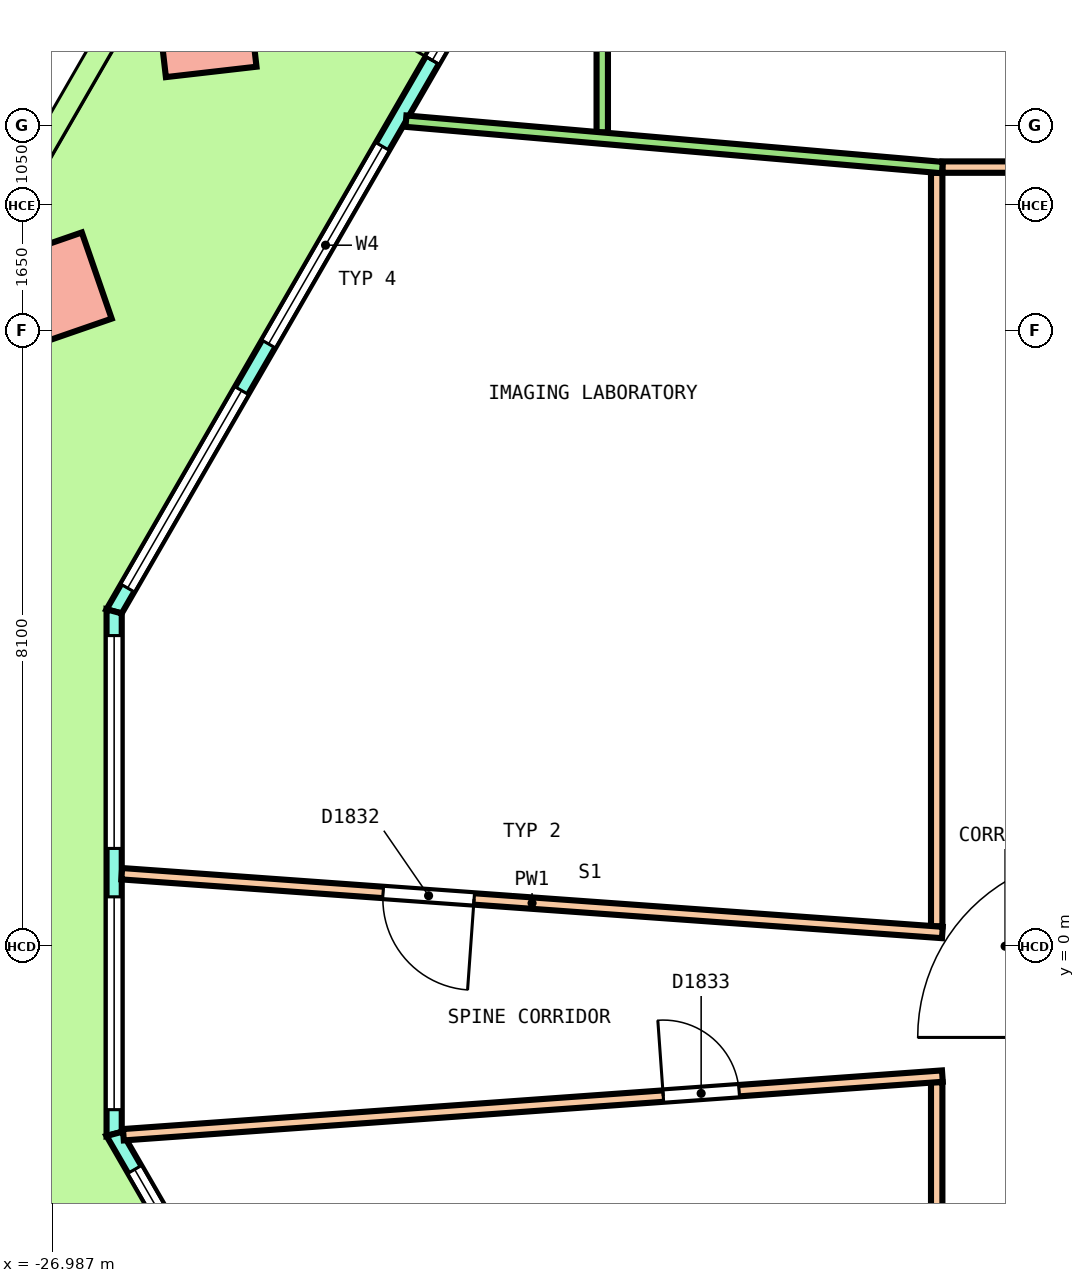
"""IFC4 building model, lengths in metres.
Left out: names, types, materials, properties, quantities, classifications, styles, units other than length and angle.
Written with IfcOpenShell. Run it as: python <this file> out.ifc"""

import sys

from ifc_helpers import new_model, si_unit, direction, frame, frame_2d, origin, origin_2d, place, context, subcontext, project, spatial, polyline, rectangle, outline, extrude, element, fill, save


model = new_model("IFC4")
c1 = context("Model", 3, precision=1e-05, world=origin(), true_north=direction((0.0, 1.0)))
c2 = subcontext(c1, "Body", "Model", "MODEL_VIEW")
j1 = project(units=[si_unit("LENGTHUNIT", "METRE"), si_unit("PLANEANGLEUNIT", "RADIAN")], contexts=[c1])
p1 = place(None, origin())
s1 = spatial("IfcSite", under=j1, at=p1, CompositionType="ELEMENT")
p2 = place(p1, origin())
s2 = spatial("IfcBuilding", under=s1, at=p2, CompositionType="ELEMENT")
p3 = place(p2, frame((0.0, 0.0, 176.0)))
s3 = spatial("IfcBuildingStorey", under=s2, at=p3, CompositionType="ELEMENT", Elevation=176.0)
p4 = place(p3, frame((-24.963, 12.098, 0.0), z_axis=(-0.025425823116, 0.018798238892, 0.999499951843), x_axis=(-0.498882626684, -0.866662044711, 0.003609023418)))
e1 = element("IfcColumn", 1, at=p4, inside=s3, PredefinedType="COLUMN", context=c2, shape_type="SweptSolid", body=[
    extrude(rectangle(XDim=1.2, YDim=1.2, at=origin_2d()), origin(), (0.0, 0.0, 1.0), 4.052),
])
p5 = place(p3, frame((-26.967, 8.627, 0.0), z_axis=(-0.021809609218, 0.025123223878, 0.999446429063), x_axis=(-0.499316957517, -0.86635106376, 0.010881647777)))
e2 = element("IfcColumn", 2, at=p5, inside=s3, PredefinedType="COLUMN", context=c2, shape_type="SweptSolid", body=[
    extrude(rectangle(XDim=1.2, YDim=1.2, at=origin_2d()), origin(), (0.0, 0.0, 1.0), 4.052),
])
p6 = place(p3, frame((-16.901, 20.463, 0.0), z_axis=(0.0, 0.0, 1.0), x_axis=(-0.500000942564, -0.866024859594, 0.0)))
e3 = element("IfcWall", 3, at=p6, inside=s3, PredefinedType="SOLIDWALL", context=c2, shape_type="SweptSolid", body=[
    extrude(outline(polyline([(-0.027, -0.1), (1.006, -0.1), (2.039, -0.1), (3.072, -0.1), (4.105, -0.1), (5.138, -0.1), (6.172, -0.1), (7.205, -0.1), (8.238, -0.1), (9.271, -0.1), (10.304, -0.1), (11.337, -0.1), (12.37, -0.1), (13.403, -0.1), (14.436, -0.1), (15.469, -0.1), (16.502, -0.1), (17.535, -0.1), (18.568, -0.1), (18.515, 0.1), (17.488, 0.1), (16.46, 0.1), (15.433, 0.1), (14.406, 0.1), (13.379, 0.1), (12.352, 0.1), (11.325, 0.1), (10.298, 0.1), (9.271, 0.1), (8.244, 0.1), (7.217, 0.1), (6.189, 0.1), (5.162, 0.1), (4.135, 0.1), (3.108, 0.1), (2.081, 0.1), (1.054, 0.1), (0.027, 0.1), (-0.027, -0.1)])), origin(), (0.0, 0.0, 1.0), 4.1),
])
p7 = place(p6, frame((0.354, 0.0, 0.1)))
e4 = element("IfcOpeningElement", 4, at=p7, cuts=e3, PredefinedType="OPENING", context=c2, shape_type="SweptSolid", body=[
    extrude(rectangle(XDim=3.0, YDim=2.9, at=frame_2d((1.5, 1.45))), frame((0.0, 0.11, 0.0), z_axis=(0.0, -1.0, 0.0), x_axis=(1.0, 0.0, 0.0)), (0.0, 0.0, 1.0), 0.22),
])
p8 = place(p6, frame((4.062, 0.0, 0.1)))
e5 = element("IfcOpeningElement", 5, at=p8, cuts=e3, PredefinedType="OPENING", context=c2, shape_type="SweptSolid", body=[
    extrude(rectangle(XDim=3.0, YDim=2.9, at=frame_2d((1.5, 1.45))), frame((0.0, 0.11, 0.0), z_axis=(0.0, -1.0, 0.0), x_axis=(1.0, 0.0, 0.0)), (0.0, 0.0, 1.0), 0.22),
])
p9 = place(p6, frame((8.371, 0.0, 0.0)))
e6 = element("IfcOpeningElement", 6, at=p9, cuts=e3, PredefinedType="OPENING", context=c2, shape_type="SweptSolid", body=[
    extrude(rectangle(XDim=1.8, YDim=2.4, at=frame_2d((0.9, 1.2))), frame((0.0, 0.11, 0.0), z_axis=(0.0, -1.0, 0.0), x_axis=(1.0, 0.0, 0.0)), (0.0, 0.0, 1.0), 0.22),
])
p10 = place(p6, frame((8.371, 0.0, 2.55)))
e7 = element("IfcOpeningElement", 7, at=p10, cuts=e3, PredefinedType="OPENING", context=c2, shape_type="SweptSolid", body=[
    extrude(rectangle(XDim=1.8, YDim=0.45, at=frame_2d((0.9, 0.225))), frame((0.0, 0.11, 0.0), z_axis=(0.0, -1.0, 0.0), x_axis=(1.0, 0.0, 0.0)), (0.0, 0.0, 1.0), 0.22),
])
p11 = place(p6, frame((11.479, 0.0, 0.1)))
e8 = element("IfcOpeningElement", 8, at=p11, cuts=e3, PredefinedType="OPENING", context=c2, shape_type="SweptSolid", body=[
    extrude(rectangle(XDim=3.0, YDim=2.9, at=frame_2d((1.5, 1.45))), frame((0.0, 0.11, 0.0), z_axis=(0.0, -1.0, 0.0), x_axis=(1.0, 0.0, 0.0)), (0.0, 0.0, 1.0), 0.22),
])
p12 = place(p6, frame((15.188, 0.0, 0.1)))
e9 = element("IfcOpeningElement", 9, at=p12, cuts=e3, PredefinedType="OPENING", context=c2, shape_type="SweptSolid", body=[
    extrude(rectangle(XDim=3.0, YDim=2.9, at=frame_2d((1.5, 1.45))), frame((0.0, 0.11, 0.0), z_axis=(0.0, -1.0, 0.0), x_axis=(1.0, 0.0, 0.0)), (0.0, 0.0, 1.0), 0.22),
])
p13 = place(p3, frame((-26.172, 4.405, 0.0), z_axis=(0.0, 0.0, 1.0), x_axis=(0.0, -1.0, 0.0)))
e10 = element("IfcWall", 10, at=p13, inside=s3, PredefinedType="SOLIDWALL", context=c2, shape_type="SweptSolid", body=[
    extrude(outline(polyline([(-0.027, -0.1), (1.128, -0.1), (2.283, -0.1), (3.438, -0.1), (4.592, -0.1), (5.747, -0.1), (6.902, -0.1), (6.848, 0.1), (5.711, 0.1), (4.574, 0.1), (3.438, 0.1), (2.301, 0.1), (1.164, 0.1), (0.027, 0.1), (-0.027, -0.1)])), origin(), (0.0, 0.0, 1.0), 4.1),
])
p14 = place(p13, frame((0.319, 0.0, 0.1)))
e11 = element("IfcOpeningElement", 11, at=p14, cuts=e10, PredefinedType="OPENING", context=c2, shape_type="SweptSolid", body=[
    extrude(rectangle(XDim=2.8, YDim=2.9, at=frame_2d((1.4, 1.45))), frame((0.0, 0.11, 0.0), z_axis=(0.0, -1.0, 0.0), x_axis=(1.0, 0.0, 0.0)), (0.0, 0.0, 1.0), 0.22),
])
p15 = place(p13, frame((3.756, 0.0, 0.1)))
e12 = element("IfcOpeningElement", 12, at=p15, cuts=e10, PredefinedType="OPENING", context=c2, shape_type="SweptSolid", body=[
    extrude(rectangle(XDim=2.8, YDim=2.9, at=frame_2d((1.4, 1.45))), frame((0.0, 0.11, 0.0), z_axis=(0.0, -1.0, 0.0), x_axis=(1.0, 0.0, 0.0)), (0.0, 0.0, 1.0), 0.22),
])
p16 = place(p3, frame((-26.172, -2.469, 0.0), z_axis=(0.0, 0.0, 1.0), x_axis=(0.500000763912, -0.866024962739, 0.0)))
e13 = element("IfcWall", 13, at=p16, inside=s3, PredefinedType="SOLIDWALL", context=c2, shape_type="SweptSolid", body=[
    extrude(outline(polyline([(-0.027, -0.1), (1.018, -0.1), (2.063, -0.1), (3.109, -0.1), (4.154, -0.1), (5.199, -0.1), (6.244, -0.1), (7.289, -0.1), (8.334, -0.1), (9.38, -0.1), (10.425, -0.1), (11.47, -0.1), (12.515, -0.1), (13.56, -0.1), (14.605, -0.1), (15.65, -0.1), (16.696, -0.1), (17.741, -0.1), (18.786, -0.1), (19.831, -0.1), (20.876, -0.1), (21.921, -0.1), (21.868, 0.1), (20.828, 0.1), (19.788, 0.1), (18.748, 0.1), (17.708, 0.1), (16.667, 0.1), (15.627, 0.1), (14.587, 0.1), (13.547, 0.1), (12.507, 0.1), (11.467, 0.1), (10.427, 0.1), (9.387, 0.1), (8.347, 0.1), (7.307, 0.1), (6.267, 0.1), (5.227, 0.1), (4.187, 0.1), (3.147, 0.1), (2.107, 0.1), (1.067, 0.1), (0.027, 0.1), (-0.027, -0.1)])), origin(), (0.0, 0.0, 1.0), 4.1),
])
p17 = place(p16, frame((0.54, 0.0, 0.1)))
e14 = element("IfcOpeningElement", 14, at=p17, cuts=e13, PredefinedType="OPENING", context=c2, shape_type="SweptSolid", body=[
    extrude(rectangle(XDim=3.3, YDim=2.9, at=frame_2d((1.65, 1.45))), frame((0.0, 0.11, 0.0), z_axis=(0.0, -1.0, 0.0), x_axis=(1.0, 0.0, 0.0)), (0.0, 0.0, 1.0), 0.22),
])
p18 = place(p16, frame((4.918, 0.0, 0.1)))
e15 = element("IfcOpeningElement", 15, at=p18, cuts=e13, PredefinedType="OPENING", context=c2, shape_type="SweptSolid", body=[
    extrude(rectangle(XDim=3.3, YDim=2.9, at=frame_2d((1.65, 1.45))), frame((0.0, 0.11, 0.0), z_axis=(0.0, -1.0, 0.0), x_axis=(1.0, 0.0, 0.0)), (0.0, 0.0, 1.0), 0.22),
])
p19 = place(p16, frame((10.047, 0.0, 0.0)))
e16 = element("IfcOpeningElement", 16, at=p19, cuts=e13, PredefinedType="OPENING", context=c2, shape_type="SweptSolid", body=[
    extrude(rectangle(XDim=1.8, YDim=2.4, at=frame_2d((0.9, 1.2))), frame((0.0, 0.11, 0.0), z_axis=(0.0, -1.0, 0.0), x_axis=(1.0, 0.0, 0.0)), (0.0, 0.0, 1.0), 0.22),
])
p20 = place(p16, frame((10.047, 0.0, 2.55)))
e17 = element("IfcOpeningElement", 17, at=p20, cuts=e13, PredefinedType="OPENING", context=c2, shape_type="SweptSolid", body=[
    extrude(rectangle(XDim=1.8, YDim=0.45, at=frame_2d((0.9, 0.225))), frame((0.0, 0.11, 0.0), z_axis=(0.0, -1.0, 0.0), x_axis=(1.0, 0.0, 0.0)), (0.0, 0.0, 1.0), 0.22),
])
p21 = place(p16, frame((13.676, 0.0, 0.1)))
e18 = element("IfcOpeningElement", 18, at=p21, cuts=e13, PredefinedType="OPENING", context=c2, shape_type="SweptSolid", body=[
    extrude(rectangle(XDim=3.3, YDim=2.9, at=frame_2d((1.65, 1.45))), frame((0.0, 0.11, 0.0), z_axis=(0.0, -1.0, 0.0), x_axis=(1.0, 0.0, 0.0)), (0.0, 0.0, 1.0), 0.22),
])
p22 = place(p16, frame((18.055, 0.0, 0.1)))
e19 = element("IfcOpeningElement", 19, at=p22, cuts=e13, PredefinedType="OPENING", context=c2, shape_type="SweptSolid", body=[
    extrude(rectangle(XDim=3.3, YDim=2.9, at=frame_2d((1.65, 1.45))), frame((0.0, 0.11, 0.0), z_axis=(0.0, -1.0, 0.0), x_axis=(1.0, 0.0, 0.0)), (0.0, 0.0, 1.0), 0.22),
])
p23 = place(p3, frame((-15.275, 10.25, 0.0), z_axis=(0.0, 0.0, 1.0), x_axis=(1.0, 0.0, 0.0)))
e20 = element("IfcWall", 20, at=p23, inside=s3, PredefinedType="PARTITIONING", context=c2, shape_type="SweptSolid", body=[
    extrude(rectangle(XDim=30.55, YDim=0.15, at=frame_2d((15.275, 0.0))), origin(), (0.0, 0.0, 1.0), 3.05),
])
p24 = place(p23, frame((26.672, 0.0, 0.0)))
e21 = element("IfcOpeningElement", 21, at=p24, cuts=e20, PredefinedType="OPENING", context=c2, shape_type="SweptSolid", body=[
    extrude(rectangle(XDim=1.2, YDim=2.1, at=frame_2d((0.6, 1.05))), frame((0.0, 0.085, 0.0), z_axis=(0.0, -1.0, 0.0), x_axis=(1.0, 0.0, 0.0)), (0.0, 0.0, 1.0), 0.17),
])
p25 = place(p23, frame((13.779, 0.0, 0.0)))
e22 = element("IfcOpeningElement", 22, at=p25, cuts=e20, PredefinedType="OPENING", context=c2, shape_type="SweptSolid", body=[
    extrude(rectangle(XDim=1.2, YDim=2.1, at=frame_2d((0.6, 1.05))), frame((0.0, 0.085, 0.0), z_axis=(0.0, -1.0, 0.0), x_axis=(1.0, 0.0, 0.0)), (0.0, 0.0, 1.0), 0.17),
])
p26 = place(p3, frame((-15.35, -10.175, 0.0), z_axis=(0.0, 0.0, 1.0), x_axis=(0.0, 1.0, 0.0)))
e23 = element("IfcWall", 23, at=p26, inside=s3, PredefinedType="PARTITIONING", context=c2, shape_type="SweptSolid", body=[
    extrude(rectangle(XDim=8.386, YDim=0.15, at=frame_2d((4.193, 0.0))), origin(), (0.0, 0.0, 1.0), 3.05),
])
p27 = place(p3, frame((-15.35, 0.261, 0.0), z_axis=(0.0, 0.0, 1.0), x_axis=(0.0, 1.0, 0.0)))
e24 = element("IfcWall", 24, at=p27, inside=s3, PredefinedType="PARTITIONING", context=c2, shape_type="SweptSolid", body=[
    extrude(rectangle(XDim=9.914, YDim=0.15, at=frame_2d((4.957, 0.0))), origin(), (0.0, 0.0, 1.0), 3.05),
])
p28 = place(p3, frame((-26.072, 0.954, 0.0), z_axis=(0.0, 0.0, 1.0), x_axis=(0.997445401141, -0.071432987776, 0.0)))
e25 = element("IfcWall", 25, at=p28, inside=s3, PredefinedType="PARTITIONING", context=c2, shape_type="SweptSolid", body=[
    extrude(rectangle(XDim=10.824, YDim=0.15, at=frame_2d((5.412, 0.0))), origin(), (0.0, 0.0, 1.0), 3.05),
])
p29 = place(p28, frame((3.447, 0.0, 0.0)))
e26 = element("IfcOpeningElement", 26, at=p29, cuts=e25, PredefinedType="OPENING", context=c2, shape_type="SweptSolid", body=[
    extrude(rectangle(XDim=1.2, YDim=2.1, at=frame_2d((0.6, 1.05))), frame((0.0, 0.085, 0.0), z_axis=(0.0, -1.0, 0.0), x_axis=(1.0, 0.0, 0.0)), (0.0, 0.0, 1.0), 0.17),
])
p30 = place(p3, frame((-26.05, -2.48, 0.0), z_axis=(0.0, 0.0, 1.0), x_axis=(0.997446409399, 0.071418907704, 0.0)))
e27 = element("IfcWall", 27, at=p30, inside=s3, PredefinedType="PARTITIONING", context=c2, shape_type="SweptSolid", body=[
    extrude(rectangle(XDim=10.802, YDim=0.15, at=frame_2d((5.401, 0.0))), origin(), (0.0, 0.0, 1.0), 3.05),
])
p31 = place(p30, frame((7.121, 0.0, 0.0)))
e28 = element("IfcOpeningElement", 28, at=p31, cuts=e27, PredefinedType="OPENING", context=c2, shape_type="SweptSolid", body=[
    extrude(rectangle(XDim=1.0, YDim=2.1, at=frame_2d((0.5, 1.05))), frame((0.0, 0.085, 0.0), z_axis=(0.0, -1.0, 0.0), x_axis=(1.0, 0.0, 0.0)), (0.0, 0.0, 1.0), 0.17),
])
p32 = place(p3, frame((-19.75, 10.706, 0.0), z_axis=(0.0, 0.0, 1.0), x_axis=(0.0, 1.0, 0.0)))
e29 = element("IfcWall", 29, at=p32, inside=s3, PredefinedType="PARTITIONING", context=c2, shape_type="SweptSolid", body=[
    extrude(rectangle(XDim=4.019, YDim=0.15, at=frame_2d((2.01, 0.0))), origin(), (0.0, 0.0, 1.0), 3.05),
])
p33 = place(p3, frame((-22.333, 10.854, 0.0), z_axis=(0.0, 0.0, 1.0), x_axis=(0.996272205844, -0.086265241334, 0.0)))
e30 = element("IfcWall", 30, at=p33, inside=s3, PredefinedType="PARTITIONING", context=c2, shape_type="SweptSolid", body=[
    extrude(rectangle(XDim=7.084, YDim=0.15, at=frame_2d((3.542, 0.0))), origin(), (0.0, 0.0, 1.0), 3.05),
])
p34 = place(p9, origin())
e31 = element("IfcDoor", 31, at=p34, inside=s3, OperationType="DOUBLE_DOOR_SINGLE_SWING", PredefinedType="DOOR", context=c2, shape_type="SweptSolid", body=[
    extrude(rectangle(XDim=1.8, YDim=2.4, at=frame_2d((0.9, 1.2))), frame((0.0, 0.025, 0.0), z_axis=(0.0, -1.0, 0.0), x_axis=(1.0, 0.0, 0.0)), (0.0, 0.0, 1.0), 0.05),
])
fill(e6, e31)
p35 = place(p10, origin())
e32 = element("IfcWindow", 32, at=p35, inside=s3, PartitioningType="SINGLE_PANEL", PredefinedType="WINDOW", context=c2, shape_type="SweptSolid", body=[
    extrude(rectangle(XDim=1.8, YDim=0.45, at=frame_2d((0.9, 0.225))), frame((0.0, 0.03, 0.0), z_axis=(0.0, -1.0, 0.0), x_axis=(1.0, 0.0, 0.0)), (0.0, 0.0, 1.0), 0.06),
])
fill(e7, e32)
p36 = place(p11, origin())
e33 = element("IfcWindow", 33, at=p36, inside=s3, PartitioningType="SINGLE_PANEL", PredefinedType="WINDOW", context=c2, shape_type="SweptSolid", body=[
    extrude(rectangle(XDim=3.0, YDim=2.9, at=frame_2d((1.5, 1.45))), frame((0.0, 0.03, 0.0), z_axis=(0.0, -1.0, 0.0), x_axis=(1.0, 0.0, 0.0)), (0.0, 0.0, 1.0), 0.06),
])
fill(e8, e33)
p37 = place(p12, origin())
e34 = element("IfcWindow", 34, at=p37, inside=s3, PartitioningType="SINGLE_PANEL", PredefinedType="WINDOW", context=c2, shape_type="SweptSolid", body=[
    extrude(rectangle(XDim=3.0, YDim=2.9, at=frame_2d((1.5, 1.45))), frame((0.0, 0.03, 0.0), z_axis=(0.0, -1.0, 0.0), x_axis=(1.0, 0.0, 0.0)), (0.0, 0.0, 1.0), 0.06),
])
fill(e9, e34)
p38 = place(p14, origin())
e35 = element("IfcWindow", 35, at=p38, inside=s3, PartitioningType="SINGLE_PANEL", PredefinedType="WINDOW", context=c2, shape_type="SweptSolid", body=[
    extrude(rectangle(XDim=2.8, YDim=2.9, at=frame_2d((1.4, 1.45))), frame((0.0, 0.03, 0.0), z_axis=(0.0, -1.0, 0.0), x_axis=(1.0, 0.0, 0.0)), (0.0, 0.0, 1.0), 0.06),
])
fill(e11, e35)
p39 = place(p15, origin())
e36 = element("IfcWindow", 36, at=p39, inside=s3, PartitioningType="SINGLE_PANEL", PredefinedType="WINDOW", context=c2, shape_type="SweptSolid", body=[
    extrude(rectangle(XDim=2.8, YDim=2.9, at=frame_2d((1.4, 1.45))), frame((0.0, 0.03, 0.0), z_axis=(0.0, -1.0, 0.0), x_axis=(1.0, 0.0, 0.0)), (0.0, 0.0, 1.0), 0.06),
])
fill(e12, e36)
p40 = place(p17, origin())
e37 = element("IfcWindow", 37, at=p40, inside=s3, PartitioningType="SINGLE_PANEL", PredefinedType="WINDOW", context=c2, shape_type="SweptSolid", body=[
    extrude(rectangle(XDim=3.3, YDim=2.9, at=frame_2d((1.65, 1.45))), frame((0.0, 0.03, 0.0), z_axis=(0.0, -1.0, 0.0), x_axis=(1.0, 0.0, 0.0)), (0.0, 0.0, 1.0), 0.06),
])
fill(e14, e37)
p41 = place(p29, origin())
e38 = element("IfcDoor", 38, at=p41, inside=s3, OperationType="DOUBLE_DOOR_SINGLE_SWING", PredefinedType="DOOR", context=c2, shape_type="SweptSolid", body=[
    extrude(rectangle(XDim=1.2, YDim=2.1, at=frame_2d((0.6, 1.05))), frame((0.0, 0.025, 0.0), z_axis=(0.0, -1.0, 0.0), x_axis=(1.0, 0.0, 0.0)), (0.0, 0.0, 1.0), 0.05),
])
fill(e26, e38)
p42 = place(p31, origin())
e39 = element("IfcDoor", 39, at=p42, inside=s3, OperationType="SINGLE_SWING_LEFT", PredefinedType="DOOR", context=c2, shape_type="SweptSolid", body=[
    extrude(rectangle(XDim=1.0, YDim=2.1, at=frame_2d((0.5, 1.05))), frame((0.0, 0.025, 0.0), z_axis=(0.0, -1.0, 0.0), x_axis=(1.0, 0.0, 0.0)), (0.0, 0.0, 1.0), 0.05),
])
fill(e28, e39)
save(model, sys.argv[1])
